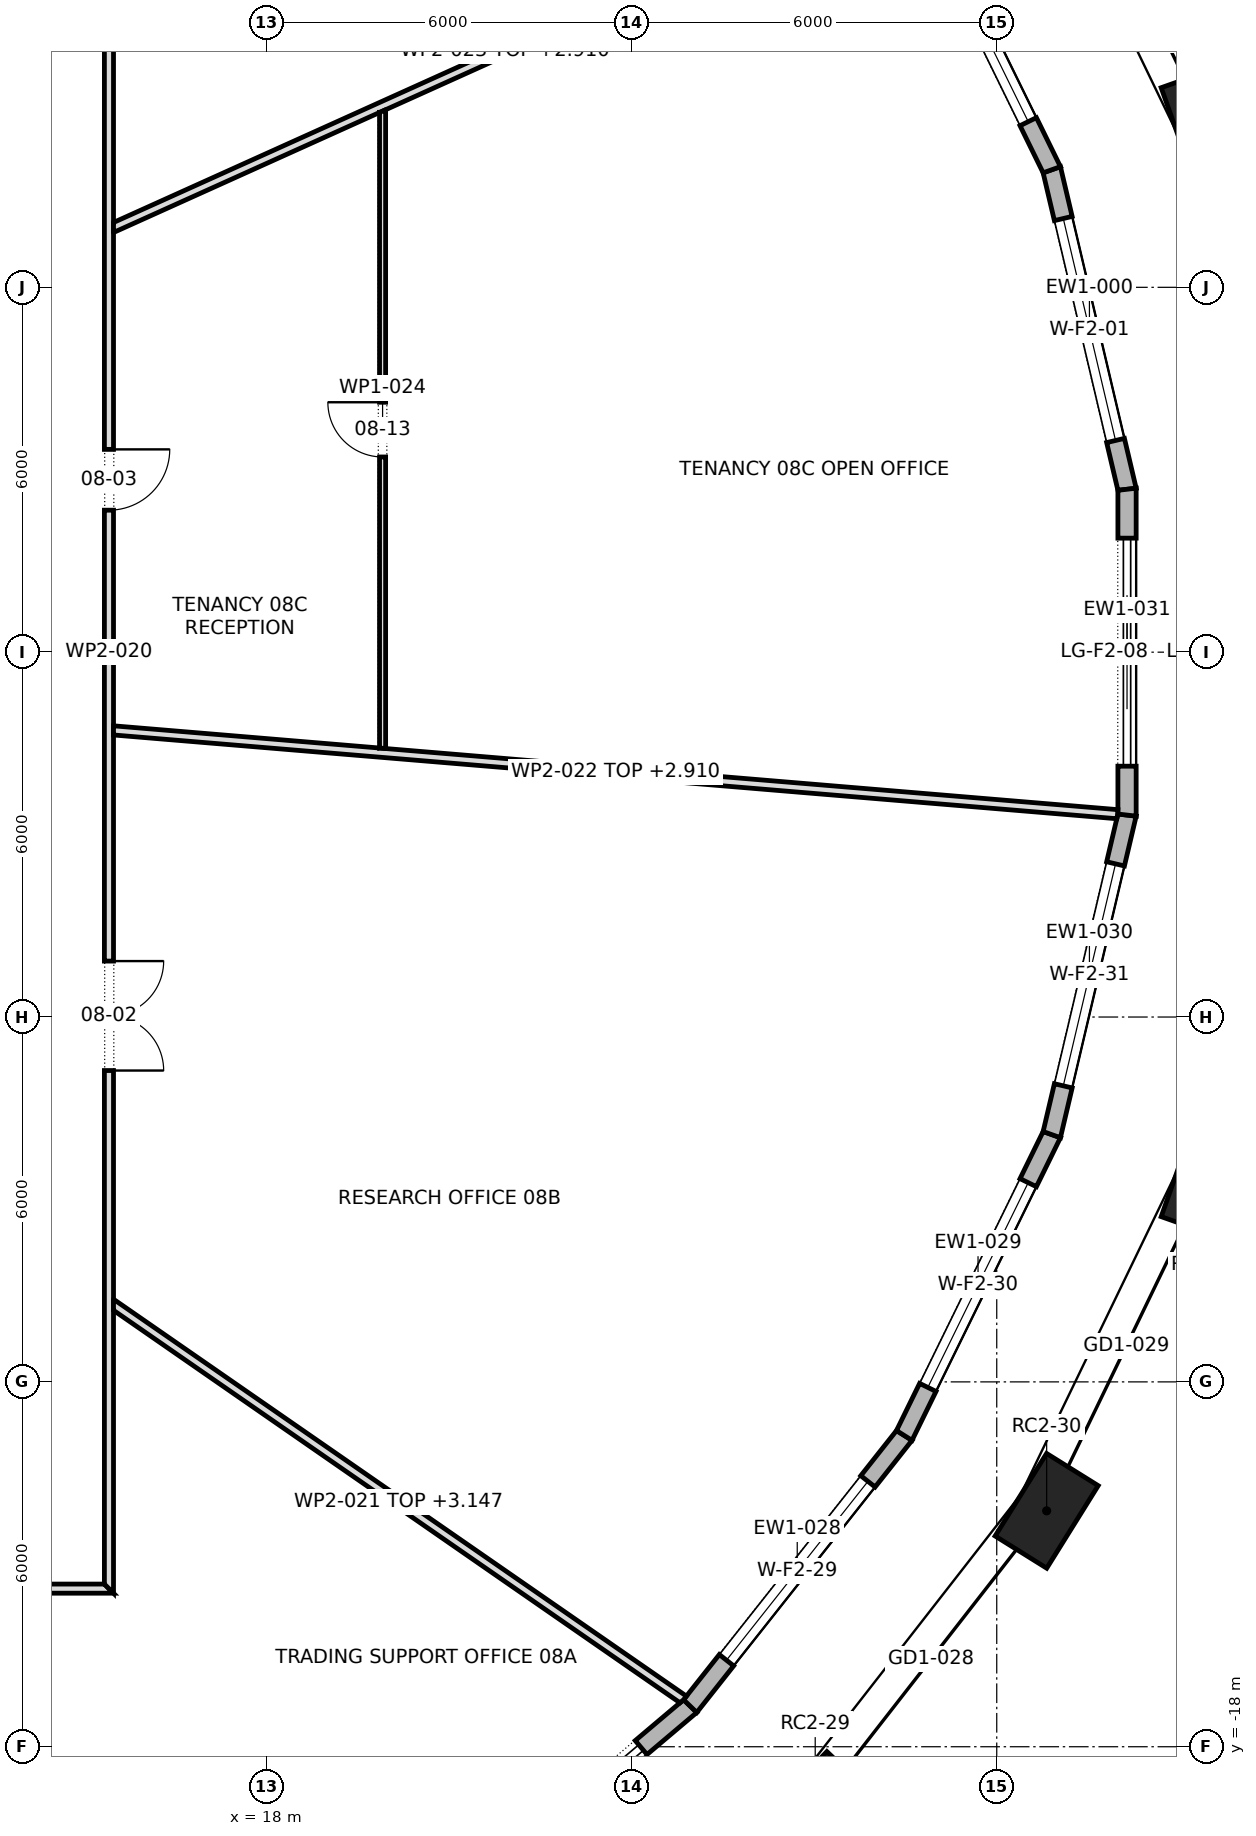
"""IFC4 building model, lengths in metres.
Left out: names, types, materials, properties, quantities, classifications, styles, units other than length and angle.
Written with IfcOpenShell. Run it as: python <this file> out.ifc"""

import sys

from ifc_helpers import new_model, si_unit, direction, frame, frame_2d, origin, origin_2d, place, context, subcontext, project, spatial, polyline, rectangle, outline, extrude, element, fill, save


model = new_model("IFC4")
c1 = context("Model", 3, precision=1e-05, world=origin(), true_north=direction((0.0, 1.0)))
c2 = subcontext(c1, "Body", "Model", "MODEL_VIEW")
j1 = project(units=[si_unit("LENGTHUNIT", "METRE"), si_unit("PLANEANGLEUNIT", "RADIAN")], contexts=[c1])
p1 = place(None, origin())
s1 = spatial("IfcSite", under=j1, at=p1, CompositionType="ELEMENT")
p2 = place(p1, origin())
s2 = spatial("IfcBuilding", under=s1, at=p2, CompositionType="ELEMENT")
p3 = place(p2, frame((0.0, 0.0, 117.1)))
s3 = spatial("IfcBuildingStorey", under=s2, at=p3, CompositionType="ELEMENT", Elevation=117.1)
for number, where, z_axis, x_axis in (
    (1, (33.443, 8.695, 0.0), (0.0, 0.0, 1.0), (-0.334, 0.943, 0.0)),
    (2, (27.015, -19.003, 0.0), (0.0, 0.0, 1.0), (0.692, 0.722, 0.0)),
    (3, (30.821, -14.121, 0.0), (0.0, 0.0, 1.0), (0.529, 0.849, 0.0)),
    (4, (33.443, -8.695, 0.0), (0.0, 0.0, 1.0), (0.334, 0.943, 0.0)),
):
    element("IfcColumn", number, at=place(p3, frame(where, z_axis=z_axis, x_axis=x_axis)), inside=s3, PredefinedType="COLUMN", context=c2, shape_type="SweptSolid", body=[
        extrude(rectangle(XDim=1.6, YDim=1.0, at=origin_2d()), origin(), (0.0, 0.0, 1.0), 4.2),
    ])
p4 = place(p3, frame((32.143, 2.679, 0.0), z_axis=(0.0, 0.0, 1.0), x_axis=(-0.229200658045, 0.973379195561, 0.0)))
e5 = element("IfcWall", 5, at=p4, inside=s3, PredefinedType="STANDARD", context=c2, shape_type="SweptSolid", body=[
    extrude(outline(polyline([(-0.017, -0.15), (5.415, -0.15), (5.382, 0.15), (0.017, 0.15), (-0.017, -0.15)])), origin(), (0.0, 0.0, 1.0), 3.9),
])
p5 = place(p4, frame((0.824, 0.0, 0.6)))
e6 = element("IfcOpeningElement", 6, at=p5, cuts=e5, PredefinedType="OPENING", context=c2, shape_type="SweptSolid", body=[
    extrude(rectangle(XDim=3.75, YDim=2.85, at=frame_2d((1.875, 1.425))), frame((0.0, 0.162, 0.0), z_axis=(0.0, -1.0, 0.0), x_axis=(1.0, 0.0, 0.0)), (0.0, 0.0, 1.0), 0.324),
])
p6 = place(p3, frame((30.905, 7.934, 0.0), z_axis=(0.0, 0.0, 1.0), x_axis=(-0.440306401535, 0.897847577692, 0.0)))
e7 = element("IfcWall", 7, at=p6, inside=s3, PredefinedType="STANDARD", context=c2, shape_type="SweptSolid", body=[
    extrude(outline(polyline([(-0.017, -0.15), (5.527, -0.15), (5.494, 0.15), (0.017, 0.15), (-0.017, -0.15)])), origin(), (0.0, 0.0, 1.0), 3.9),
])
p7 = place(p6, frame((0.88, 0.0, 0.6)))
e8 = element("IfcOpeningElement", 8, at=p7, cuts=e7, PredefinedType="OPENING", context=c2, shape_type="SweptSolid", body=[
    extrude(rectangle(XDim=3.75, YDim=2.85, at=frame_2d((1.875, 1.425))), frame((0.0, 0.162, 0.0), z_axis=(0.0, -1.0, 0.0), x_axis=(1.0, 0.0, 0.0)), (0.0, 0.0, 1.0), 0.324),
])
p8 = place(p3, frame((20.48, -21.115, 0.0), z_axis=(0.0, 0.0, 1.0), x_axis=(0.763937302001, 0.645290476151, 0.0)))
e9 = element("IfcWall", 9, at=p8, inside=s3, PredefinedType="STANDARD", context=c2, shape_type="SweptSolid", body=[
    extrude(outline(polyline([(-0.014, -0.15), (5.877, -0.15), (5.847, 0.15), (0.014, 0.15), (-0.014, -0.15)])), origin(), (0.0, 0.0, 1.0), 3.9),
])
p9 = place(p8, frame((1.056, 0.0, 0.0)))
e10 = element("IfcOpeningElement", 10, at=p9, cuts=e9, PredefinedType="OPENING", context=c2, shape_type="SweptSolid", body=[
    extrude(rectangle(XDim=3.75, YDim=3.45, at=frame_2d((1.875, 1.725))), frame((0.0, 0.162, 0.0), z_axis=(0.0, -1.0, 0.0), x_axis=(1.0, 0.0, 0.0)), (0.0, 0.0, 1.0), 0.324),
])
p10 = place(p3, frame((24.958, -17.332, 0.0), z_axis=(0.0, 0.0, 1.0), x_axis=(0.62038332391, 0.784298751379, 0.0)))
e11 = element("IfcWall", 11, at=p10, inside=s3, PredefinedType="STANDARD", context=c2, shape_type="SweptSolid", body=[
    extrude(outline(polyline([(-0.015, -0.15), (5.691, -0.15), (5.659, 0.15), (0.015, 0.15), (-0.015, -0.15)])), origin(), (0.0, 0.0, 1.0), 3.9),
])
p11 = place(p10, frame((0.962, 0.0, 0.6)))
e12 = element("IfcOpeningElement", 12, at=p11, cuts=e11, PredefinedType="OPENING", context=c2, shape_type="SweptSolid", body=[
    extrude(rectangle(XDim=3.75, YDim=2.85, at=frame_2d((1.875, 1.425))), frame((0.0, 0.162, 0.0), z_axis=(0.0, -1.0, 0.0), x_axis=(1.0, 0.0, 0.0)), (0.0, 0.0, 1.0), 0.324),
])
p12 = place(p3, frame((28.479, -12.881, 0.0), z_axis=(0.0, 0.0, 1.0), x_axis=(0.440306401535, 0.897847577692, 0.0)))
e13 = element("IfcWall", 13, at=p12, inside=s3, PredefinedType="STANDARD", context=c2, shape_type="SweptSolid", body=[
    extrude(outline(polyline([(-0.016, -0.15), (5.527, -0.15), (5.494, 0.15), (0.016, 0.15), (-0.016, -0.15)])), origin(), (0.0, 0.0, 1.0), 3.9),
])
p13 = place(p12, frame((0.88, 0.0, 0.6)))
e14 = element("IfcOpeningElement", 14, at=p13, cuts=e13, PredefinedType="OPENING", context=c2, shape_type="SweptSolid", body=[
    extrude(rectangle(XDim=3.75, YDim=2.85, at=frame_2d((1.875, 1.425))), frame((0.0, 0.162, 0.0), z_axis=(0.0, -1.0, 0.0), x_axis=(1.0, 0.0, 0.0)), (0.0, 0.0, 1.0), 0.324),
])
p14 = place(p3, frame((30.905, -7.934, 0.0), z_axis=(0.0, 0.0, 1.0), x_axis=(0.229200658045, 0.973379195561, 0.0)))
e15 = element("IfcWall", 15, at=p14, inside=s3, PredefinedType="STANDARD", context=c2, shape_type="SweptSolid", body=[
    extrude(outline(polyline([(-0.017, -0.15), (5.416, -0.15), (5.381, 0.15), (0.017, 0.15), (-0.017, -0.15)])), origin(), (0.0, 0.0, 1.0), 3.9),
])
p15 = place(p14, frame((0.824, 0.0, 0.6)))
e16 = element("IfcOpeningElement", 16, at=p15, cuts=e15, PredefinedType="OPENING", context=c2, shape_type="SweptSolid", body=[
    extrude(rectangle(XDim=3.75, YDim=2.85, at=frame_2d((1.875, 1.425))), frame((0.0, 0.162, 0.0), z_axis=(0.0, -1.0, 0.0), x_axis=(1.0, 0.0, 0.0)), (0.0, 0.0, 1.0), 0.324),
])
p16 = place(p3, frame((32.143, -2.679, 0.0), z_axis=(0.0, 0.0, 1.0), x_axis=(0.0, 1.0, 0.0)))
e17 = element("IfcWall", 17, at=p16, inside=s3, PredefinedType="STANDARD", context=c2, shape_type="SweptSolid", body=[
    extrude(outline(polyline([(-0.017, -0.15), (5.375, -0.15), (5.341, 0.15), (0.017, 0.15), (-0.017, -0.15)])), origin(), (0.0, 0.0, 1.0), 3.9),
])
p17 = place(p16, frame((0.804, 0.0, 0.0)))
e18 = element("IfcOpeningElement", 18, at=p17, cuts=e17, PredefinedType="OPENING", context=c2, shape_type="SweptSolid", body=[
    extrude(rectangle(XDim=3.75, YDim=3.45, at=frame_2d((1.875, 1.725))), frame((0.0, 0.162, 0.0), z_axis=(0.0, -1.0, 0.0), x_axis=(1.0, 0.0, 0.0)), (0.0, 0.0, 1.0), 0.324),
])
p18 = place(p3, frame((-15.475, -15.4, 0.0), z_axis=(0.0, 0.0, 1.0), x_axis=(1.0, 0.0, 0.0)))
e19 = element("IfcWall", 19, at=p18, inside=s3, PredefinedType="PARTITIONING", context=c2, shape_type="SweptSolid", body=[
    extrude(outline(polyline([(0.0, -0.075), (1.935, -0.075), (3.869, -0.075), (5.803, -0.075), (7.738, -0.075), (9.672, -0.075), (11.606, -0.075), (13.541, -0.075), (15.475, -0.075), (17.409, -0.075), (19.344, -0.075), (21.278, -0.075), (23.212, -0.075), (25.147, -0.075), (27.081, -0.075), (29.016, -0.075), (30.95, -0.075), (30.8, 0.075), (28.885, 0.075), (26.969, 0.075), (25.053, 0.075), (23.138, 0.075), (21.222, 0.075), (19.306, 0.075), (17.391, 0.075), (15.475, 0.075), (13.56, 0.075), (11.644, 0.075), (9.728, 0.075), (7.812, 0.075), (5.897, 0.075), (3.981, 0.075), (2.066, 0.075), (0.15, 0.075), (0.0, -0.075)])), origin(), (0.0, 0.0, 1.0), 3.9),
])
p19 = place(p18, frame((27.545, 0.0, 0.0)))
e20 = element("IfcOpeningElement", 20, at=p19, cuts=e19, PredefinedType="OPENING", context=c2, shape_type="SweptSolid", body=[
    extrude(rectangle(XDim=1.0, YDim=2.1, at=frame_2d((0.5, 1.05))), frame((0.0, 0.087, 0.0), z_axis=(0.0, -1.0, 0.0), x_axis=(1.0, 0.0, 0.0)), (0.0, 0.0, 1.0), 0.174),
])
p20 = place(p18, frame((5.975, 0.0, 0.0)))
e21 = element("IfcOpeningElement", 21, at=p20, cuts=e19, PredefinedType="OPENING", context=c2, shape_type="SweptSolid", body=[
    extrude(rectangle(XDim=1.8, YDim=2.1, at=frame_2d((0.9, 1.05))), frame((0.0, 0.087, 0.0), z_axis=(0.0, -1.0, 0.0), x_axis=(1.0, 0.0, 0.0)), (0.0, 0.0, 1.0), 0.174),
])
p21 = place(p18, frame((20.78, 0.0, 0.0)))
e22 = element("IfcOpeningElement", 22, at=p21, cuts=e19, PredefinedType="OPENING", context=c2, shape_type="SweptSolid", body=[
    extrude(rectangle(XDim=1.0, YDim=2.1, at=frame_2d((0.5, 1.05))), frame((0.0, 0.087, 0.0), z_axis=(0.0, -1.0, 0.0), x_axis=(1.0, 0.0, 0.0)), (0.0, 0.0, 1.0), 0.174),
])
p22 = place(p18, frame((15.01, 0.0, 0.0)))
e23 = element("IfcOpeningElement", 23, at=p22, cuts=e19, PredefinedType="OPENING", context=c2, shape_type="SweptSolid", body=[
    extrude(rectangle(XDim=1.0, YDim=2.1, at=frame_2d((0.5, 1.05))), frame((0.0, 0.087, 0.0), z_axis=(0.0, -1.0, 0.0), x_axis=(1.0, 0.0, 0.0)), (0.0, 0.0, 1.0), 0.174),
])
p23 = place(p3, frame((9.762, -15.435, 0.0), z_axis=(0.0, 0.0, 1.0), x_axis=(0.534830284385, -0.844959506074, 0.0)))
e24 = element("IfcWall", 24, at=p23, inside=s3, PredefinedType="PARTITIONING", context=c2, shape_type="SweptSolid", body=[
    extrude(outline(polyline([(0.0, -0.075), (1.726, -0.075), (3.452, -0.075), (5.177, -0.075), (5.211, -0.022), (5.295, -0.075), (6.883, -0.075), (8.47, -0.075), (10.057, -0.075), (10.057, 0.075), (8.064, 0.075), (6.072, 0.075), (4.08, 0.075), (2.087, 0.075), (0.095, 0.075), (0.0, -0.075), (0.0, -0.075)])), origin(), (0.0, 0.0, 1.0), 3.147),
])
p24 = place(p3, frame((15.4, -15.475, 0.0), z_axis=(0.0, 0.0, 1.0), x_axis=(0.0, 1.0, 0.0)))
e25 = element("IfcWall", 25, at=p24, inside=s3, PredefinedType="PARTITIONING", context=c2, shape_type="SweptSolid", body=[
    extrude(outline(polyline([(0.0, -0.075), (1.935, -0.075), (3.869, -0.075), (5.803, -0.075), (7.738, -0.075), (9.672, -0.075), (11.606, -0.075), (13.541, -0.075), (15.475, -0.075), (17.409, -0.075), (19.344, -0.075), (21.278, -0.075), (23.212, -0.075), (25.147, -0.075), (27.081, -0.075), (29.016, -0.075), (30.95, -0.075), (30.8, 0.075), (28.885, 0.075), (26.969, 0.075), (25.053, 0.075), (23.138, 0.075), (21.222, 0.075), (19.306, 0.075), (17.391, 0.075), (15.475, 0.075), (13.56, 0.075), (11.644, 0.075), (9.728, 0.075), (7.812, 0.075), (5.897, 0.075), (3.981, 0.075), (2.066, 0.075), (0.15, 0.075), (0.0, -0.075)])), origin(), (0.0, 0.0, 1.0), 3.9),
])
p25 = place(p24, frame((8.595, 0.0, 0.0)))
e26 = element("IfcOpeningElement", 26, at=p25, cuts=e25, PredefinedType="OPENING", context=c2, shape_type="SweptSolid", body=[
    extrude(rectangle(XDim=1.8, YDim=2.1, at=frame_2d((0.9, 1.05))), frame((0.0, 0.087, 0.0), z_axis=(0.0, -1.0, 0.0), x_axis=(1.0, 0.0, 0.0)), (0.0, 0.0, 1.0), 0.174),
])
p26 = place(p24, frame((17.81, 0.0, 0.0)))
e27 = element("IfcOpeningElement", 27, at=p26, cuts=e25, PredefinedType="OPENING", context=c2, shape_type="SweptSolid", body=[
    extrude(rectangle(XDim=1.0, YDim=2.1, at=frame_2d((0.5, 1.05))), frame((0.0, 0.087, 0.0), z_axis=(0.0, -1.0, 0.0), x_axis=(1.0, 0.0, 0.0)), (0.0, 0.0, 1.0), 0.174),
])
p27 = place(p24, frame((25.75, 0.0, 0.0)))
e28 = element("IfcOpeningElement", 28, at=p27, cuts=e25, PredefinedType="OPENING", context=c2, shape_type="SweptSolid", body=[
    extrude(rectangle(XDim=1.8, YDim=2.1, at=frame_2d((0.9, 1.05))), frame((0.0, 0.087, 0.0), z_axis=(0.0, -1.0, 0.0), x_axis=(1.0, 0.0, 0.0)), (0.0, 0.0, 1.0), 0.174),
])
p28 = place(p3, frame((15.433, -10.702, 0.0), z_axis=(0.0, 0.0, 1.0), x_axis=(0.82200427234, -0.56948132213, 0.0)))
e29 = element("IfcWall", 29, at=p28, inside=s3, PredefinedType="PARTITIONING", context=c2, shape_type="SweptSolid", body=[
    extrude(outline(polyline([(0.104, -0.075), (1.992, -0.075), (3.881, -0.075), (5.77, -0.075), (7.659, -0.075), (9.548, -0.075), (11.437, -0.075), (11.457, 0.0), (11.461, 0.071), (11.461, 0.075), (9.551, 0.075), (7.641, 0.075), (5.731, 0.075), (3.821, 0.075), (1.91, 0.075), (0.0, 0.075), (0.0, 0.074), (0.104, -0.075)])), origin(), (0.0, 0.0, 1.0), 3.147),
])
p29 = place(p3, frame((15.469, -1.286, 0.0), z_axis=(0.0, 0.0, 1.0), x_axis=(0.996533353756, -0.083194199634, 0.0)))
e30 = element("IfcWall", 30, at=p29, inside=s3, PredefinedType="PARTITIONING", context=c2, shape_type="SweptSolid", body=[
    extrude(outline(polyline([(0.012, -0.075), (1.852, -0.075), (3.691, -0.075), (5.531, -0.075), (7.371, -0.075), (9.21, -0.075), (11.05, -0.075), (12.89, -0.075), (14.729, -0.075), (16.569, -0.075), (16.574, -0.037), (16.574, 0.075), (14.836, 0.075), (13.097, 0.075), (11.358, 0.075), (9.619, 0.075), (7.881, 0.075), (6.142, 0.075), (4.403, 0.075), (4.39, 0.074), (4.39, 0.075), (2.927, 0.075), (1.463, 0.075), (0.0, 0.075), (0.0, 0.069), (0.012, -0.075)])), origin(), (0.0, 0.0, 1.0), 2.91),
])
p30 = place(p3, frame((15.444, 6.97, 0.0), z_axis=(0.0, 0.0, 1.0), x_axis=(0.911543819319, 0.411202949237, 0.0)))
e31 = element("IfcWall", 31, at=p30, inside=s3, PredefinedType="PARTITIONING", context=c2, shape_type="SweptSolid", body=[
    extrude(outline(polyline([(0.0, -0.075), (1.6, -0.075), (3.2, -0.075), (4.8, -0.075), (4.801, -0.073), (4.805, -0.075), (6.677, -0.075), (8.549, -0.075), (10.421, -0.075), (12.293, -0.075), (14.166, -0.075), (14.166, -0.063), (14.163, 0.007), (14.146, 0.075), (12.386, 0.075), (10.627, 0.075), (8.867, 0.075), (7.107, 0.075), (5.347, 0.075), (3.587, 0.075), (1.828, 0.075), (0.068, 0.075), (0.0, -0.075)])), origin(), (0.0, 0.0, 1.0), 2.91),
])
p31 = place(p3, frame((19.9, 8.92, 0.0), z_axis=(0.0, 0.0, 1.0), x_axis=(0.0, -1.0, 0.0)))
e32 = element("IfcWall", 32, at=p31, inside=s3, PredefinedType="PARTITIONING", context=c2, shape_type="SweptSolid", body=[
    extrude(outline(polyline([(0.045, -0.05), (1.787, -0.05), (3.529, -0.05), (5.271, -0.05), (7.012, -0.05), (8.754, -0.05), (10.496, -0.05), (10.504, 0.048), (10.504, 0.05), (8.754, 0.05), (7.003, 0.05), (5.252, 0.05), (3.501, 0.05), (1.751, 0.05), (0.0, 0.05), (0.0, 0.049), (0.045, -0.05)])), origin(), (0.0, 0.0, 1.0), 3.9),
])
p32 = place(p31, frame((4.81, 0.0, 0.0)))
e33 = element("IfcOpeningElement", 33, at=p32, cuts=e32, PredefinedType="OPENING", context=c2, shape_type="SweptSolid", body=[
    extrude(rectangle(XDim=0.9, YDim=2.1, at=frame_2d((0.45, 1.05))), frame((0.0, 0.062, 0.0), z_axis=(0.0, -1.0, 0.0), x_axis=(1.0, 0.0, 0.0)), (0.0, 0.0, 1.0), 0.124),
])
p33 = place(p5, origin())
e34 = element("IfcWindow", 34, at=p33, inside=s3, PartitioningType="TRIPLE_PANEL_VERTICAL", PredefinedType="WINDOW", context=c2, shape_type="SweptSolid", body=[
    extrude(rectangle(XDim=3.75, YDim=2.85, at=frame_2d((1.875, 1.425))), frame((0.0, 0.03, 0.0), z_axis=(0.0, -1.0, 0.0), x_axis=(1.0, 0.0, 0.0)), (0.0, 0.0, 1.0), 0.06),
])
fill(e6, e34)
p34 = place(p7, origin())
e35 = element("IfcWindow", 35, at=p34, inside=s3, PartitioningType="TRIPLE_PANEL_VERTICAL", PredefinedType="WINDOW", context=c2, shape_type="SweptSolid", body=[
    extrude(rectangle(XDim=3.75, YDim=2.85, at=frame_2d((1.875, 1.425))), frame((0.0, 0.03, 0.0), z_axis=(0.0, -1.0, 0.0), x_axis=(1.0, 0.0, 0.0)), (0.0, 0.0, 1.0), 0.06),
])
fill(e8, e35)
p35 = place(p9, origin())
e36 = element("IfcDoor", 36, at=p35, inside=s3, OperationType="DOUBLE_DOOR_SLIDING", PredefinedType="DOOR", context=c2, shape_type="SweptSolid", body=[
    extrude(rectangle(XDim=3.75, YDim=3.45, at=frame_2d((1.875, 1.725))), frame((0.0, 0.025, 0.0), z_axis=(0.0, -1.0, 0.0), x_axis=(1.0, 0.0, 0.0)), (0.0, 0.0, 1.0), 0.05),
])
fill(e10, e36)
p36 = place(p11, origin())
e37 = element("IfcWindow", 37, at=p36, inside=s3, PartitioningType="TRIPLE_PANEL_VERTICAL", PredefinedType="WINDOW", context=c2, shape_type="SweptSolid", body=[
    extrude(rectangle(XDim=3.75, YDim=2.85, at=frame_2d((1.875, 1.425))), frame((0.0, 0.03, 0.0), z_axis=(0.0, -1.0, 0.0), x_axis=(1.0, 0.0, 0.0)), (0.0, 0.0, 1.0), 0.06),
])
fill(e12, e37)
p37 = place(p13, origin())
e38 = element("IfcWindow", 38, at=p37, inside=s3, PartitioningType="TRIPLE_PANEL_VERTICAL", PredefinedType="WINDOW", context=c2, shape_type="SweptSolid", body=[
    extrude(rectangle(XDim=3.75, YDim=2.85, at=frame_2d((1.875, 1.425))), frame((0.0, 0.03, 0.0), z_axis=(0.0, -1.0, 0.0), x_axis=(1.0, 0.0, 0.0)), (0.0, 0.0, 1.0), 0.06),
])
fill(e14, e38)
p38 = place(p15, origin())
e39 = element("IfcWindow", 39, at=p38, inside=s3, PartitioningType="TRIPLE_PANEL_VERTICAL", PredefinedType="WINDOW", context=c2, shape_type="SweptSolid", body=[
    extrude(rectangle(XDim=3.75, YDim=2.85, at=frame_2d((1.875, 1.425))), frame((0.0, 0.03, 0.0), z_axis=(0.0, -1.0, 0.0), x_axis=(1.0, 0.0, 0.0)), (0.0, 0.0, 1.0), 0.06),
])
fill(e16, e39)
p39 = place(p17, origin())
e40 = element("IfcDoor", 40, at=p39, inside=s3, OperationType="DOUBLE_DOOR_SLIDING", PredefinedType="DOOR", context=c2, shape_type="SweptSolid", body=[
    extrude(rectangle(XDim=3.75, YDim=3.45, at=frame_2d((1.875, 1.725))), frame((0.0, 0.025, 0.0), z_axis=(0.0, -1.0, 0.0), x_axis=(1.0, 0.0, 0.0)), (0.0, 0.0, 1.0), 0.05),
])
fill(e18, e40)
p40 = place(p25, frame((1.8, 0.0, 0.0), z_axis=(0.0, 0.0, 1.0), x_axis=(-1.0, 0.0, 0.0)))
e41 = element("IfcDoor", 41, at=p40, inside=s3, OperationType="DOUBLE_DOOR_SINGLE_SWING", PredefinedType="DOOR", context=c2, shape_type="SweptSolid", body=[
    extrude(rectangle(XDim=1.8, YDim=2.1, at=frame_2d((0.9, 1.05))), frame((0.0, 0.025, 0.0), z_axis=(0.0, -1.0, 0.0), x_axis=(1.0, 0.0, 0.0)), (0.0, 0.0, 1.0), 0.05),
])
fill(e26, e41)
p41 = place(p26, frame((1.0, 0.0, 0.0), z_axis=(0.0, 0.0, 1.0), x_axis=(-1.0, 0.0, 0.0)))
e42 = element("IfcDoor", 42, at=p41, inside=s3, OperationType="SINGLE_SWING_RIGHT", PredefinedType="DOOR", context=c2, shape_type="SweptSolid", body=[
    extrude(rectangle(XDim=1.0, YDim=2.1, at=frame_2d((0.5, 1.05))), frame((0.0, 0.025, 0.0), z_axis=(0.0, -1.0, 0.0), x_axis=(1.0, 0.0, 0.0)), (0.0, 0.0, 1.0), 0.05),
])
fill(e27, e42)
p42 = place(p32, frame((0.9, 0.0, 0.0), z_axis=(0.0, 0.0, 1.0), x_axis=(-1.0, 0.0, 0.0)))
e43 = element("IfcDoor", 43, at=p42, inside=s3, OperationType="SINGLE_SWING_LEFT", PredefinedType="DOOR", context=c2, shape_type="SweptSolid", body=[
    extrude(rectangle(XDim=0.9, YDim=2.1, at=frame_2d((0.45, 1.05))), frame((0.0, 0.025, 0.0), z_axis=(0.0, -1.0, 0.0), x_axis=(1.0, 0.0, 0.0)), (0.0, 0.0, 1.0), 0.05),
])
fill(e33, e43)
save(model, sys.argv[1])
